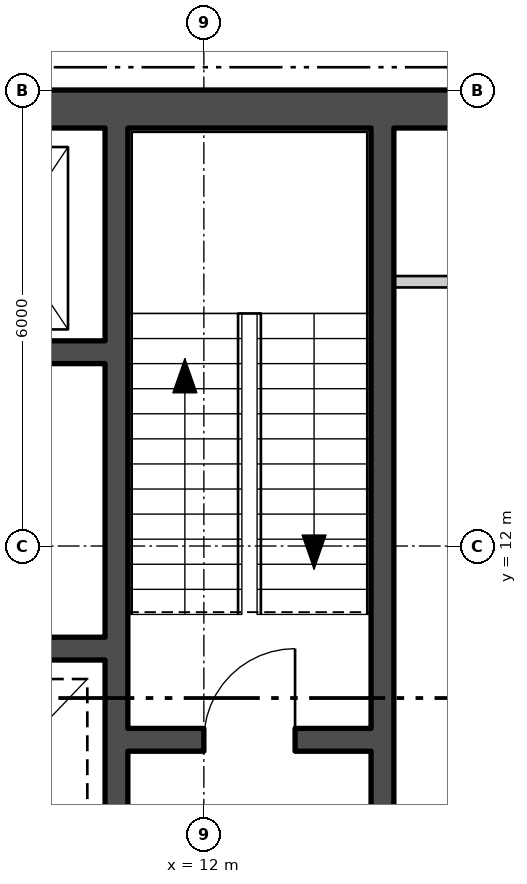
"""IFC4 building model, lengths in metres.
Left out: names, types, materials, properties, quantities, classifications, styles, units other than length and angle.
Written with IfcOpenShell. Run it as: python <this file> out.ifc"""

import sys

from ifc_helpers import new_model, si_unit, direction, frame, frame_2d, origin, place, context, subcontext, project, spatial, polyline, rectangle, outline, extrude, element, fill, save


model = new_model("IFC4")
c1 = context("Model", 3, precision=1e-05, world=origin(), true_north=direction((0.0, 1.0)))
c2 = subcontext(c1, "Body", "Model", "MODEL_VIEW")
j1 = project(units=[si_unit("LENGTHUNIT", "METRE"), si_unit("PLANEANGLEUNIT", "RADIAN")], contexts=[c1])
p1 = place(None, origin())
s1 = spatial("IfcSite", under=j1, at=p1, CompositionType="ELEMENT")
p2 = place(p1, origin())
s2 = spatial("IfcBuilding", under=s1, at=p2, CompositionType="ELEMENT")
p3 = place(p2, frame((0.0, 0.0, 139.8)))
s3 = spatial("IfcBuildingStorey", under=s2, at=p3, CompositionType="ELEMENT", Elevation=139.8)
p4 = place(p3, frame((4.36, -27.198, -0.18), z_axis=(0.0, 0.0, 1.0), x_axis=(0.500000335318, 0.866025210188, 0.0)))
e1 = element("IfcWall", 1, at=p4, inside=s3, PredefinedType="SOLIDWALL", context=c2, shape_type="SweptSolid", body=[
    extrude(outline(polyline([(-0.13, -0.225), (45.88, -0.225), (45.62, 0.225), (0.13, 0.225), (-0.13, -0.225)])), origin(), (0.0, 0.0, 1.0), 3.68),
])
p5 = place(p4, frame((1.425, 0.0, 1.08)))
e2 = element("IfcOpeningElement", 2, at=p5, cuts=e1, PredefinedType="OPENING", context=c2, shape_type="SweptSolid", body=[
    extrude(rectangle(XDim=2.4, YDim=2.0, at=frame_2d((1.2, 1.0))), frame((0.0, 0.235, 0.0), z_axis=(0.0, -1.0, 0.0), x_axis=(1.0, 0.0, 0.0)), (0.0, 0.0, 1.0), 0.47),
])
p6 = place(p4, frame((5.895, 0.0, 1.08)))
e3 = element("IfcOpeningElement", 3, at=p6, cuts=e1, PredefinedType="OPENING", context=c2, shape_type="SweptSolid", body=[
    extrude(rectangle(XDim=2.4, YDim=2.0, at=frame_2d((1.2, 1.0))), frame((0.0, 0.235, 0.0), z_axis=(0.0, -1.0, 0.0), x_axis=(1.0, 0.0, 0.0)), (0.0, 0.0, 1.0), 0.47),
])
p7 = place(p4, frame((10.403, 0.0, 1.08)))
e4 = element("IfcOpeningElement", 4, at=p7, cuts=e1, PredefinedType="OPENING", context=c2, shape_type="SweptSolid", body=[
    extrude(rectangle(XDim=2.4, YDim=2.0, at=frame_2d((1.2, 1.0))), frame((0.0, 0.235, 0.0), z_axis=(0.0, -1.0, 0.0), x_axis=(1.0, 0.0, 0.0)), (0.0, 0.0, 1.0), 0.47),
])
p8 = place(p4, frame((14.912, 0.0, 1.08)))
e5 = element("IfcOpeningElement", 5, at=p8, cuts=e1, PredefinedType="OPENING", context=c2, shape_type="SweptSolid", body=[
    extrude(rectangle(XDim=2.4, YDim=2.0, at=frame_2d((1.2, 1.0))), frame((0.0, 0.235, 0.0), z_axis=(0.0, -1.0, 0.0), x_axis=(1.0, 0.0, 0.0)), (0.0, 0.0, 1.0), 0.47),
])
p9 = place(p4, frame((19.421, 0.0, 1.08)))
e6 = element("IfcOpeningElement", 6, at=p9, cuts=e1, PredefinedType="OPENING", context=c2, shape_type="SweptSolid", body=[
    extrude(rectangle(XDim=2.4, YDim=2.0, at=frame_2d((1.2, 1.0))), frame((0.0, 0.235, 0.0), z_axis=(0.0, -1.0, 0.0), x_axis=(1.0, 0.0, 0.0)), (0.0, 0.0, 1.0), 0.47),
])
p10 = place(p4, frame((23.929, 0.0, 1.08)))
e7 = element("IfcOpeningElement", 7, at=p10, cuts=e1, PredefinedType="OPENING", context=c2, shape_type="SweptSolid", body=[
    extrude(rectangle(XDim=2.4, YDim=2.0, at=frame_2d((1.2, 1.0))), frame((0.0, 0.235, 0.0), z_axis=(0.0, -1.0, 0.0), x_axis=(1.0, 0.0, 0.0)), (0.0, 0.0, 1.0), 0.47),
])
p11 = place(p4, frame((37.455, 0.0, 1.08)))
e8 = element("IfcOpeningElement", 8, at=p11, cuts=e1, PredefinedType="OPENING", context=c2, shape_type="SweptSolid", body=[
    extrude(rectangle(XDim=2.4, YDim=2.0, at=frame_2d((1.2, 1.0))), frame((0.0, 0.235, 0.0), z_axis=(0.0, -1.0, 0.0), x_axis=(1.0, 0.0, 0.0)), (0.0, 0.0, 1.0), 0.47),
])
p12 = place(p4, frame((41.925, 0.0, 1.08)))
e9 = element("IfcOpeningElement", 9, at=p12, cuts=e1, PredefinedType="OPENING", context=c2, shape_type="SweptSolid", body=[
    extrude(rectangle(XDim=2.4, YDim=2.0, at=frame_2d((1.2, 1.0))), frame((0.0, 0.235, 0.0), z_axis=(0.0, -1.0, 0.0), x_axis=(1.0, 0.0, 0.0)), (0.0, 0.0, 1.0), 0.47),
])
p13 = place(p3, frame((-16.2, 17.75, 0.0), z_axis=(0.0, 0.0, 1.0), x_axis=(1.0, 0.0, 0.0)))
e10 = element("IfcWall", 10, at=p13, inside=s3, PredefinedType="SHEAR", context=c2, shape_type="SweptSolid", body=[
    extrude(rectangle(XDim=32.4, YDim=0.5, at=frame_2d((16.2, 0.0))), origin(), (0.0, 0.0, 1.0), 3.7),
])
p14 = place(p3, frame((10.85, 2.5, 0.0), z_axis=(0.0, 0.0, 1.0), x_axis=(0.0, 1.0, 0.0)))
e11 = element("IfcWall", 11, at=p14, inside=s3, PredefinedType="SHEAR", context=c2, shape_type="SweptSolid", body=[
    extrude(rectangle(XDim=15.0, YDim=0.3, at=frame_2d((7.5, 0.0))), origin(), (0.0, 0.0, 1.0), 3.7),
])
p15 = place(p14, frame((3.475, 0.0, 0.0)))
e12 = element("IfcOpeningElement", 12, at=p15, cuts=e11, PredefinedType="OPENING", context=c2, shape_type="SweptSolid", body=[
    extrude(rectangle(XDim=1.25, YDim=2.1, at=frame_2d((0.625, 1.05))), frame((0.0, 0.16, 0.0), z_axis=(0.0, -1.0, 0.0), x_axis=(1.0, 0.0, 0.0)), (0.0, 0.0, 1.0), 0.32),
])
p16 = place(p14, frame((1.125, 0.0, 0.0)))
e13 = element("IfcOpeningElement", 13, at=p16, cuts=e11, PredefinedType="OPENING", context=c2, shape_type="SweptSolid", body=[
    extrude(rectangle(XDim=1.0, YDim=2.1, at=frame_2d((0.5, 1.05))), frame((0.0, 0.16, 0.0), z_axis=(0.0, -1.0, 0.0), x_axis=(1.0, 0.0, 0.0)), (0.0, 0.0, 1.0), 0.32),
])
p17 = place(p3, frame((14.35, 2.5, 0.0), z_axis=(0.0, 0.0, 1.0), x_axis=(0.0, 1.0, 0.0)))
e14 = element("IfcWall", 14, at=p17, inside=s3, PredefinedType="SHEAR", context=c2, shape_type="SweptSolid", body=[
    extrude(rectangle(XDim=15.0, YDim=0.3, at=frame_2d((7.5, 0.0))), origin(), (0.0, 0.0, 1.0), 3.7),
])
p18 = place(p17, frame((4.35, 0.0, 0.0)))
e15 = element("IfcOpeningElement", 15, at=p18, cuts=e14, PredefinedType="OPENING", context=c2, shape_type="SweptSolid", body=[
    extrude(rectangle(XDim=1.5, YDim=2.1, at=frame_2d((0.75, 1.05))), frame((0.0, 0.16, 0.0), z_axis=(0.0, -1.0, 0.0), x_axis=(1.0, 0.0, 0.0)), (0.0, 0.0, 1.0), 0.32),
])
p19 = place(p3, frame((11.0, 9.45, 0.0), z_axis=(0.0, 0.0, 1.0), x_axis=(1.0, 0.0, 0.0)))
e16 = element("IfcWall", 16, at=p19, inside=s3, PredefinedType="SHEAR", context=c2, shape_type="SweptSolid", body=[
    extrude(rectangle(XDim=3.2, YDim=0.3, at=frame_2d((1.6, 0.0))), origin(), (0.0, 0.0, 1.0), 3.7),
])
p20 = place(p19, frame((1.0, 0.0, 0.0)))
e17 = element("IfcOpeningElement", 17, at=p20, cuts=e16, PredefinedType="OPENING", context=c2, shape_type="SweptSolid", body=[
    extrude(rectangle(XDim=1.2, YDim=2.1, at=frame_2d((0.6, 1.05))), frame((0.0, 0.16, 0.0), z_axis=(0.0, -1.0, 0.0), x_axis=(1.0, 0.0, 0.0)), (0.0, 0.0, 1.0), 0.32),
])
p21 = place(p3, frame((-10.7, 14.55, 0.0), z_axis=(0.0, 0.0, 1.0), x_axis=(1.0, 0.0, 0.0)))
e18 = element("IfcWall", 18, at=p21, inside=s3, PredefinedType="SHEAR", context=c2, shape_type="SweptSolid", body=[
    extrude(rectangle(XDim=21.4, YDim=0.3, at=frame_2d((10.7, 0.0))), origin(), (0.0, 0.0, 1.0), 3.7),
])
p22 = place(p21, frame((0.738, 0.0, 0.0)))
e19 = element("IfcOpeningElement", 19, at=p22, cuts=e18, PredefinedType="OPENING", context=c2, shape_type="SweptSolid", body=[
    extrude(rectangle(XDim=1.1, YDim=2.1, at=frame_2d((0.55, 1.05))), frame((0.0, 0.16, 0.0), z_axis=(0.0, -1.0, 0.0), x_axis=(1.0, 0.0, 0.0)), (0.0, 0.0, 1.0), 0.32),
])
p23 = place(p21, frame((3.462, 0.0, 0.0)))
e20 = element("IfcOpeningElement", 20, at=p23, cuts=e18, PredefinedType="OPENING", context=c2, shape_type="SweptSolid", body=[
    extrude(rectangle(XDim=1.1, YDim=2.1, at=frame_2d((0.55, 1.05))), frame((0.0, 0.16, 0.0), z_axis=(0.0, -1.0, 0.0), x_axis=(1.0, 0.0, 0.0)), (0.0, 0.0, 1.0), 0.32),
])
p24 = place(p21, frame((6.138, 0.0, 0.0)))
e21 = element("IfcOpeningElement", 21, at=p24, cuts=e18, PredefinedType="OPENING", context=c2, shape_type="SweptSolid", body=[
    extrude(rectangle(XDim=1.1, YDim=2.1, at=frame_2d((0.55, 1.05))), frame((0.0, 0.16, 0.0), z_axis=(0.0, -1.0, 0.0), x_axis=(1.0, 0.0, 0.0)), (0.0, 0.0, 1.0), 0.32),
])
p25 = place(p21, frame((8.812, 0.0, 0.0)))
e22 = element("IfcOpeningElement", 22, at=p25, cuts=e18, PredefinedType="OPENING", context=c2, shape_type="SweptSolid", body=[
    extrude(rectangle(XDim=1.1, YDim=2.1, at=frame_2d((0.55, 1.05))), frame((0.0, 0.16, 0.0), z_axis=(0.0, -1.0, 0.0), x_axis=(1.0, 0.0, 0.0)), (0.0, 0.0, 1.0), 0.32),
])
p26 = place(p21, frame((19.562, 0.0, 0.0)))
e23 = element("IfcOpeningElement", 23, at=p26, cuts=e18, PredefinedType="OPENING", context=c2, shape_type="SweptSolid", body=[
    extrude(rectangle(XDim=1.1, YDim=2.1, at=frame_2d((0.55, 1.05))), frame((0.0, 0.16, 0.0), z_axis=(0.0, -1.0, 0.0), x_axis=(1.0, 0.0, 0.0)), (0.0, 0.0, 1.0), 0.32),
])
p27 = place(p21, frame((11.537, 0.0, 0.0)))
e24 = element("IfcOpeningElement", 24, at=p27, cuts=e18, PredefinedType="OPENING", context=c2, shape_type="SweptSolid", body=[
    extrude(rectangle(XDim=1.0, YDim=2.1, at=frame_2d((0.5, 1.05))), frame((0.0, 0.16, 0.0), z_axis=(0.0, -1.0, 0.0), x_axis=(1.0, 0.0, 0.0)), (0.0, 0.0, 1.0), 0.32),
])
p28 = place(p21, frame((14.213, 0.0, 0.0)))
e25 = element("IfcOpeningElement", 25, at=p28, cuts=e18, PredefinedType="OPENING", context=c2, shape_type="SweptSolid", body=[
    extrude(rectangle(XDim=1.0, YDim=2.1, at=frame_2d((0.5, 1.05))), frame((0.0, 0.16, 0.0), z_axis=(0.0, -1.0, 0.0), x_axis=(1.0, 0.0, 0.0)), (0.0, 0.0, 1.0), 0.32),
])
p29 = place(p21, frame((16.887, 0.0, 0.0)))
e26 = element("IfcOpeningElement", 26, at=p29, cuts=e18, PredefinedType="OPENING", context=c2, shape_type="SweptSolid", body=[
    extrude(rectangle(XDim=1.0, YDim=2.1, at=frame_2d((0.5, 1.05))), frame((0.0, 0.16, 0.0), z_axis=(0.0, -1.0, 0.0), x_axis=(1.0, 0.0, 0.0)), (0.0, 0.0, 1.0), 0.32),
])
p30 = place(p3, frame((2.6, 10.65, 0.0), z_axis=(0.0, 0.0, 1.0), x_axis=(1.0, 0.0, 0.0)))
e27 = element("IfcWall", 27, at=p30, inside=s3, PredefinedType="SHEAR", context=c2, shape_type="SweptSolid", body=[
    extrude(rectangle(XDim=8.1, YDim=0.3, at=frame_2d((4.05, 0.0))), origin(), (0.0, 0.0, 1.0), 3.7),
])
p31 = place(p30, frame((0.933, 0.0, 0.0)))
e28 = element("IfcOpeningElement", 28, at=p31, cuts=e27, PredefinedType="OPENING", context=c2, shape_type="SweptSolid", body=[
    extrude(rectangle(XDim=1.0, YDim=2.1, at=frame_2d((0.5, 1.05))), frame((0.0, 0.16, 0.0), z_axis=(0.0, -1.0, 0.0), x_axis=(1.0, 0.0, 0.0)), (0.0, 0.0, 1.0), 0.32),
])
p32 = place(p3, frame((14.5, 15.477, 0.0), z_axis=(0.0, 0.0, 1.0), x_axis=(1.0, 0.0, 0.0)))
e29 = element("IfcWall", 29, at=p32, inside=s3, PredefinedType="PARTITIONING", context=c2, shape_type="SweptSolid", body=[
    extrude(rectangle(XDim=1.2, YDim=0.15, at=frame_2d((0.6, 0.0))), origin(), (0.0, 0.0, 1.0), 3.7),
])
p33 = place(p20, origin())
e30 = element("IfcDoor", 30, at=p33, inside=s3, OperationType="SINGLE_SWING_LEFT", PredefinedType="DOOR", context=c2, shape_type="SweptSolid", body=[
    extrude(rectangle(XDim=1.2, YDim=2.1, at=frame_2d((0.6, 1.05))), frame((0.0, 0.025, 0.0), z_axis=(0.0, -1.0, 0.0), x_axis=(1.0, 0.0, 0.0)), (0.0, 0.0, 1.0), 0.05),
])
fill(e17, e30)
save(model, sys.argv[1])
